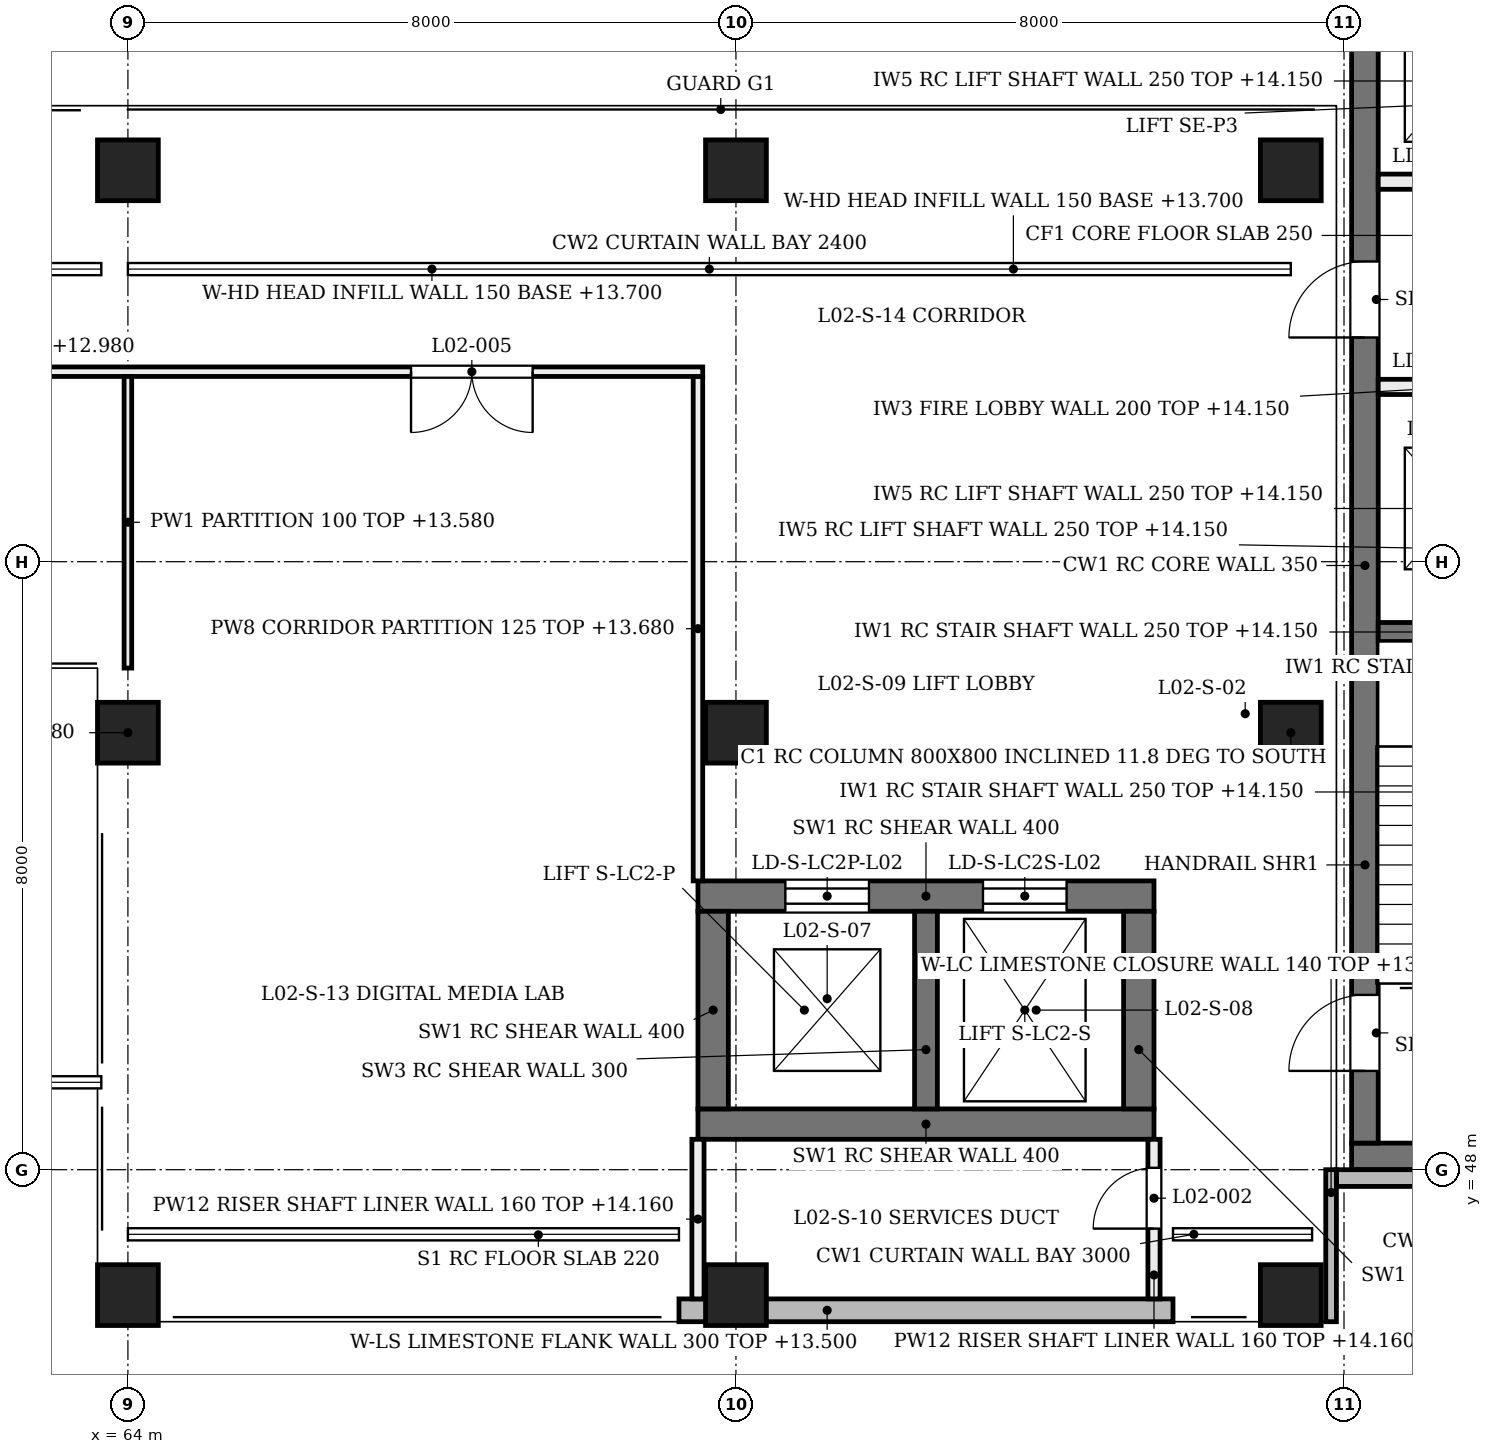
"""IFC4 building model, lengths in metres.
Left out: names, types, materials, properties, quantities, classifications, styles, units other than length and angle.
Written with IfcOpenShell. Run it as: python <this file> out.ifc"""

import sys

from ifc_helpers import new_model, si_unit, direction, frame, frame_2d, origin, origin_2d, place, context, subcontext, project, spatial, rectangle, extrude, element, fill, save


model = new_model("IFC4")
c1 = context("Model", 3, precision=1e-05, world=origin(), true_north=direction((0.0, 1.0)))
c2 = subcontext(c1, "Body", "Model", "MODEL_VIEW")
j1 = project(units=[si_unit("LENGTHUNIT", "METRE"), si_unit("PLANEANGLEUNIT", "RADIAN")], contexts=[c1])
p1 = place(None, origin())
s1 = spatial("IfcSite", under=j1, at=p1, CompositionType="ELEMENT")
p2 = place(p1, origin())
s2 = spatial("IfcBuilding", under=s1, at=p2, CompositionType="ELEMENT")
p3 = place(p2, frame((0.0, 0.0, 9.6)))
s3 = spatial("IfcBuildingStorey", under=s2, at=p3, CompositionType="ELEMENT", Elevation=9.6)
p4 = place(p3, frame((71.5, 48.6, 0.0), z_axis=(0.0, 0.0, 1.0), x_axis=(1.0, 0.0, 0.0)))
e1 = element("IfcWall", 1, at=p4, inside=s3, PredefinedType="SHEAR", context=c2, shape_type="SweptSolid", body=[
    extrude(rectangle(XDim=6.0, YDim=0.4, at=frame_2d((3.0, 0.0))), origin(), (0.0, 0.0, 1.0), 4.58),
])
p5 = place(p3, frame((71.5, 51.6, 0.0), z_axis=(0.0, 0.0, 1.0), x_axis=(1.0, 0.0, 0.0)))
e2 = element("IfcWall", 2, at=p5, inside=s3, PredefinedType="SHEAR", context=c2, shape_type="SweptSolid", body=[
    extrude(rectangle(XDim=6.0, YDim=0.4, at=frame_2d((3.0, 0.0))), origin(), (0.0, 0.0, 1.0), 4.58),
])
p6 = place(p5, frame((1.15, 0.0, 0.0)))
e3 = element("IfcOpeningElement", 3, at=p6, cuts=e2, PredefinedType="OPENING", context=c2, shape_type="SweptSolid", body=[
    extrude(rectangle(XDim=1.1, YDim=2.1, at=frame_2d((0.55, 1.05))), frame((0.0, 0.21, 0.0), z_axis=(0.0, -1.0, 0.0), x_axis=(1.0, 0.0, 0.0)), (0.0, 0.0, 1.0), 0.42),
])
p7 = place(p5, frame((3.75, 0.0, 0.0)))
e4 = element("IfcOpeningElement", 4, at=p7, cuts=e2, PredefinedType="OPENING", context=c2, shape_type="SweptSolid", body=[
    extrude(rectangle(XDim=1.1, YDim=2.1, at=frame_2d((0.55, 1.05))), frame((0.0, 0.21, 0.0), z_axis=(0.0, -1.0, 0.0), x_axis=(1.0, 0.0, 0.0)), (0.0, 0.0, 1.0), 0.42),
])
for number, where, z_axis, x_axis in (
    (5, (71.7, 48.8, 0.0), (0.0, 0.0, 1.0), (0.0, 1.0, 0.0)),
    (6, (77.3, 48.8, 0.0), (0.0, 0.0, 1.0), (0.0, 1.0, 0.0)),
):
    element("IfcWall", number, at=place(p3, frame(where, z_axis=z_axis, x_axis=x_axis)), inside=s3, PredefinedType="SHEAR", context=c2, shape_type="SweptSolid", body=[
        extrude(rectangle(XDim=2.6, YDim=0.4, at=frame_2d((1.3, 0.0))), origin(), (0.0, 0.0, 1.0), 4.58),
    ])
p8 = place(p3, frame((74.5, 48.8, 0.0), z_axis=(0.0, 0.0, 1.0), x_axis=(0.0, 1.0, 0.0)))
e7 = element("IfcWall", 7, at=p8, inside=s3, PredefinedType="SHEAR", context=c2, shape_type="SweptSolid", body=[
    extrude(rectangle(XDim=2.6, YDim=0.3, at=frame_2d((1.3, 0.0))), origin(), (0.0, 0.0, 1.0), 4.58),
])
p9 = place(p3, frame((80.1, 48.175, 0.0), z_axis=(0.0, 0.0, 1.0), x_axis=(1.0, 0.0, 0.0)))
e8 = element("IfcWall", 8, at=p9, inside=s3, PredefinedType="SHEAR", context=c2, shape_type="SweptSolid", body=[
    extrude(rectangle(XDim=7.9, YDim=0.35, at=frame_2d((3.95, 0.0))), origin(), (0.0, 0.0, 1.0), 4.58),
])
p10 = place(p3, frame((80.275, 48.35, 0.0), z_axis=(0.0, 0.0, 1.0), x_axis=(0.0, 1.0, 0.0)))
e9 = element("IfcWall", 9, at=p10, inside=s3, PredefinedType="SHEAR", context=c2, shape_type="SweptSolid", body=[
    extrude(rectangle(XDim=15.2, YDim=0.35, at=frame_2d((7.6, 0.0))), origin(), (0.0, 0.0, 1.0), 4.58),
])
p11 = place(p10, frame((0.95, 0.0, 0.0)))
e10 = element("IfcOpeningElement", 10, at=p11, cuts=e9, PredefinedType="OPENING", context=c2, shape_type="SweptSolid", body=[
    extrude(rectangle(XDim=1.0, YDim=2.1, at=frame_2d((0.5, 1.05))), frame((0.0, 0.185, 0.0), z_axis=(0.0, -1.0, 0.0), x_axis=(1.0, 0.0, 0.0)), (0.0, 0.0, 1.0), 0.37),
])
p12 = place(p10, frame((10.6, 0.0, 0.0)))
e11 = element("IfcOpeningElement", 11, at=p12, cuts=e9, PredefinedType="OPENING", context=c2, shape_type="SweptSolid", body=[
    extrude(rectangle(XDim=1.0, YDim=2.1, at=frame_2d((0.5, 1.05))), frame((0.0, 0.185, 0.0), z_axis=(0.0, -1.0, 0.0), x_axis=(1.0, 0.0, 0.0)), (0.0, 0.0, 1.0), 0.37),
])
for number, where, z_axis, x_axis in (
    (12, (64.0, 46.6, 0.0), (0.0, -0.204, 0.979), (1.0, 0.0, 0.0)),
    (13, (72.0, 46.6, 0.0), (0.0, -0.204, 0.979), (1.0, 0.0, 0.0)),
    (14, (79.3, 46.6, 0.0), (0.0, -0.204, 0.979), (1.0, 0.0, 0.0)),
):
    element("IfcColumn", number, at=place(p3, frame(where, z_axis=z_axis, x_axis=x_axis)), inside=s3, PredefinedType="COLUMN", context=c2, shape_type="SweptSolid", body=[
        extrude(rectangle(XDim=0.8, YDim=0.8, at=origin_2d()), origin(), (0.0, 0.0, 1.0), 4.903),
    ])
p13 = place(p3, frame((64.0, 54.046, -0.22), z_axis=(0.0, -0.203965661733, 0.978978043081), x_axis=(1.0, 0.0, 0.0)))
e15 = element("IfcColumn", 15, at=p13, inside=s3, PredefinedType="COLUMN", context=c2, shape_type="SweptSolid", body=[
    extrude(rectangle(XDim=0.8, YDim=0.8, at=origin_2d()), origin(), (0.0, 0.0, 1.0), 5.128),
])
for number, where, z_axis, x_axis in (
    (16, (72.0, 54.0, 0.0), (0.0, -0.204, 0.979), (1.0, 0.0, 0.0)),
    (17, (79.3, 54.0, 0.0), (0.0, -0.204, 0.979), (1.0, 0.0, 0.0)),
):
    element("IfcColumn", number, at=place(p3, frame(where, z_axis=z_axis, x_axis=x_axis)), inside=s3, PredefinedType="COLUMN", context=c2, shape_type="SweptSolid", body=[
        extrude(rectangle(XDim=0.8, YDim=0.8, at=origin_2d()), origin(), (0.0, 0.0, 1.0), 4.903),
    ])
p14 = place(p3, frame((64.0, 61.446, -0.22), z_axis=(0.0, -0.203965661733, 0.978978043081), x_axis=(1.0, 0.0, 0.0)))
e18 = element("IfcColumn", 18, at=p14, inside=s3, PredefinedType="COLUMN", context=c2, shape_type="SweptSolid", body=[
    extrude(rectangle(XDim=0.8, YDim=0.8, at=origin_2d()), origin(), (0.0, 0.0, 1.0), 5.128),
])
for number, where, z_axis, x_axis in (
    (19, (72.0, 61.4, 0.0), (0.0, -0.204, 0.979), (1.0, 0.0, 0.0)),
    (20, (79.3, 61.4, 0.0), (0.0, -0.204, 0.979), (1.0, 0.0, 0.0)),
):
    element("IfcColumn", number, at=place(p3, frame(where, z_axis=z_axis, x_axis=x_axis)), inside=s3, PredefinedType="COLUMN", context=c2, shape_type="SweptSolid", body=[
        extrude(rectangle(XDim=0.8, YDim=0.8, at=origin_2d()), origin(), (0.0, 0.0, 1.0), 4.903),
    ])
p15 = place(p3, frame((71.25, 46.15, 0.0), z_axis=(0.0, 0.0, 1.0), x_axis=(1.0, 0.0, 0.0)))
e21 = element("IfcWall", 21, at=p15, inside=s3, PredefinedType="SOLIDWALL", context=c2, shape_type="SweptSolid", body=[
    extrude(rectangle(XDim=6.5, YDim=0.3, at=frame_2d((3.25, 0.0))), origin(), (0.0, 0.0, 1.0), 3.9),
])
p16 = place(p3, frame((64.2, 59.85, 4.1), z_axis=(0.0, 0.0, 1.0), x_axis=(1.0, 0.0, 0.0)))
e22 = element("IfcWall", 22, at=p16, inside=s3, PredefinedType="SOLIDWALL", context=c2, shape_type="SweptSolid", body=[
    extrude(rectangle(XDim=7.6, YDim=0.15, at=frame_2d((3.8, 0.0))), origin(), (0.0, 0.0, 1.0), 0.48),
])
p17 = place(p3, frame((72.2, 59.85, 4.1), z_axis=(0.0, 0.0, 1.0), x_axis=(1.0, 0.0, 0.0)))
e23 = element("IfcWall", 23, at=p17, inside=s3, PredefinedType="SOLIDWALL", context=c2, shape_type="SweptSolid", body=[
    extrude(rectangle(XDim=6.9, YDim=0.15, at=frame_2d((3.45, 0.0))), origin(), (0.0, 0.0, 1.0), 0.48),
])
p18 = place(p3, frame((79.9, 47.89, 0.0), z_axis=(0.0, 0.0, 1.0), x_axis=(1.0, 0.0, 0.0)))
e24 = element("IfcWall", 24, at=p18, inside=s3, PredefinedType="SOLIDWALL", context=c2, shape_type="SweptSolid", body=[
    extrude(rectangle(XDim=8.2, YDim=0.22, at=frame_2d((4.1, 0.0))), origin(), (0.0, 0.0, 1.0), 3.9),
])
p19 = place(p18, frame((1.308, 0.0, 0.9)))
e25 = element("IfcOpeningElement", 25, at=p19, cuts=e24, PredefinedType="OPENING", context=c2, shape_type="SweptSolid", body=[
    extrude(rectangle(XDim=0.45, YDim=2.6, at=frame_2d((0.225, 1.3))), frame((0.0, 0.12, 0.0), z_axis=(0.0, -1.0, 0.0), x_axis=(1.0, 0.0, 0.0)), (0.0, 0.0, 1.0), 0.24),
])
p20 = place(p18, frame((3.975, 0.0, 0.9)))
e26 = element("IfcOpeningElement", 26, at=p20, cuts=e24, PredefinedType="OPENING", context=c2, shape_type="SweptSolid", body=[
    extrude(rectangle(XDim=0.45, YDim=2.6, at=frame_2d((0.225, 1.3))), frame((0.0, 0.12, 0.0), z_axis=(0.0, -1.0, 0.0), x_axis=(1.0, 0.0, 0.0)), (0.0, 0.0, 1.0), 0.24),
])
p21 = place(p18, frame((6.642, 0.0, 0.9)))
e27 = element("IfcOpeningElement", 27, at=p21, cuts=e24, PredefinedType="OPENING", context=c2, shape_type="SweptSolid", body=[
    extrude(rectangle(XDim=0.45, YDim=2.6, at=frame_2d((0.225, 1.3))), frame((0.0, 0.12, 0.0), z_axis=(0.0, -1.0, 0.0), x_axis=(1.0, 0.0, 0.0)), (0.0, 0.0, 1.0), 0.24),
])
p22 = place(p3, frame((79.83, 46.0, 0.0), z_axis=(0.0, 0.0, 1.0), x_axis=(0.0, 1.0, 0.0)))
e28 = element("IfcWall", 28, at=p22, inside=s3, PredefinedType="SOLIDWALL", context=c2, shape_type="SweptSolid", body=[
    extrude(rectangle(XDim=2.0, YDim=0.14, at=frame_2d((1.0, 0.0))), origin(), (0.0, 0.0, 1.0), 3.9),
])
p23 = place(p3, frame((83.55, 55.075, 0.0), z_axis=(0.0, 0.0, 1.0), x_axis=(-1.0, 0.0, 0.0)))
e29 = element("IfcWall", 29, at=p23, inside=s3, PredefinedType="SOLIDWALL", context=c2, shape_type="SweptSolid", body=[
    extrude(rectangle(XDim=3.1, YDim=0.25, at=frame_2d((1.55, 0.0))), origin(), (0.0, 0.0, 1.0), 4.55),
])
p24 = place(p3, frame((87.65, 58.3, 0.0), z_axis=(0.0, 0.0, 1.0), x_axis=(-1.0, 0.0, 0.0)))
e30 = element("IfcWall", 30, at=p24, inside=s3, PredefinedType="SOLIDWALL", context=c2, shape_type="SweptSolid", body=[
    extrude(rectangle(XDim=7.2, YDim=0.2, at=frame_2d((3.6, 0.0))), origin(), (0.0, 0.0, 1.0), 4.55),
])
p25 = place(p24, frame((0.5, 0.0, 0.0)))
e31 = element("IfcOpeningElement", 31, at=p25, cuts=e30, PredefinedType="OPENING", context=c2, shape_type="SweptSolid", body=[
    extrude(rectangle(XDim=1.1, YDim=2.1, at=frame_2d((0.55, 1.05))), frame((0.0, 0.11, 0.0), z_axis=(0.0, -1.0, 0.0), x_axis=(1.0, 0.0, 0.0)), (0.0, 0.0, 1.0), 0.22),
])
p26 = place(p24, frame((5.6, 0.0, 0.0)))
e32 = element("IfcOpeningElement", 32, at=p26, cuts=e30, PredefinedType="OPENING", context=c2, shape_type="SweptSolid", body=[
    extrude(rectangle(XDim=1.1, YDim=2.1, at=frame_2d((0.55, 1.05))), frame((0.0, 0.11, 0.0), z_axis=(0.0, -1.0, 0.0), x_axis=(1.0, 0.0, 0.0)), (0.0, 0.0, 1.0), 0.22),
])
p27 = place(p24, frame((3.1, 0.0, 0.0)))
e33 = element("IfcOpeningElement", 33, at=p27, cuts=e30, PredefinedType="OPENING", context=c2, shape_type="SweptSolid", body=[
    extrude(rectangle(XDim=1.0, YDim=2.1, at=frame_2d((0.5, 1.05))), frame((0.0, 0.11, 0.0), z_axis=(0.0, -1.0, 0.0), x_axis=(1.0, 0.0, 0.0)), (0.0, 0.0, 1.0), 0.22),
])
p28 = place(p3, frame((87.65, 61.0, 0.0), z_axis=(0.0, 0.0, 1.0), x_axis=(-1.0, 0.0, 0.0)))
e34 = element("IfcWall", 34, at=p28, inside=s3, PredefinedType="SOLIDWALL", context=c2, shape_type="SweptSolid", body=[
    extrude(rectangle(XDim=7.2, YDim=0.2, at=frame_2d((3.6, 0.0))), origin(), (0.0, 0.0, 1.0), 4.55),
])
p29 = place(p28, frame((0.5, 0.0, 0.0)))
e35 = element("IfcOpeningElement", 35, at=p29, cuts=e34, PredefinedType="OPENING", context=c2, shape_type="SweptSolid", body=[
    extrude(rectangle(XDim=1.1, YDim=2.1, at=frame_2d((0.55, 1.05))), frame((0.0, 0.11, 0.0), z_axis=(0.0, -1.0, 0.0), x_axis=(1.0, 0.0, 0.0)), (0.0, 0.0, 1.0), 0.22),
])
p30 = place(p28, frame((5.6, 0.0, 0.0)))
e36 = element("IfcOpeningElement", 36, at=p30, cuts=e34, PredefinedType="OPENING", context=c2, shape_type="SweptSolid", body=[
    extrude(rectangle(XDim=1.1, YDim=2.1, at=frame_2d((0.55, 1.05))), frame((0.0, 0.11, 0.0), z_axis=(0.0, -1.0, 0.0), x_axis=(1.0, 0.0, 0.0)), (0.0, 0.0, 1.0), 0.22),
])
p31 = place(p28, frame((3.1, 0.0, 0.0)))
e37 = element("IfcOpeningElement", 37, at=p31, cuts=e34, PredefinedType="OPENING", context=c2, shape_type="SweptSolid", body=[
    extrude(rectangle(XDim=1.0, YDim=2.1, at=frame_2d((0.5, 1.05))), frame((0.0, 0.11, 0.0), z_axis=(0.0, -1.0, 0.0), x_axis=(1.0, 0.0, 0.0)), (0.0, 0.0, 1.0), 0.22),
])
p32 = place(p3, frame((77.5, 46.3, 0.0), z_axis=(0.0, 0.0, 1.0), x_axis=(0.0, 1.0, 0.0)))
e38 = element("IfcWall", 38, at=p32, inside=s3, PredefinedType="PARTITIONING", context=c2, shape_type="SweptSolid", body=[
    extrude(rectangle(XDim=2.1, YDim=0.16, at=frame_2d((1.05, 0.0))), origin(), (0.0, 0.0, 1.0), 4.56),
])
p33 = place(p32, frame((0.925, 0.0, 0.0)))
e39 = element("IfcOpeningElement", 39, at=p33, cuts=e38, PredefinedType="OPENING", context=c2, shape_type="SweptSolid", body=[
    extrude(rectangle(XDim=0.8, YDim=2.1, at=frame_2d((0.4, 1.05))), frame((0.0, 0.09, 0.0), z_axis=(0.0, -1.0, 0.0), x_axis=(1.0, 0.0, 0.0)), (0.0, 0.0, 1.0), 0.18),
])
p34 = place(p3, frame((71.5, 46.3, 0.0), z_axis=(0.0, 0.0, 1.0), x_axis=(0.0, 1.0, 0.0)))
e40 = element("IfcWall", 40, at=p34, inside=s3, PredefinedType="PARTITIONING", context=c2, shape_type="SweptSolid", body=[
    extrude(rectangle(XDim=2.1, YDim=0.16, at=frame_2d((1.05, 0.0))), origin(), (0.0, 0.0, 1.0), 4.56),
])
p35 = place(p3, frame((71.5, 51.8, 0.0), z_axis=(0.0, 0.0, 1.0), x_axis=(0.0, 1.0, 0.0)))
e41 = element("IfcWall", 41, at=p35, inside=s3, PredefinedType="PARTITIONING", context=c2, shape_type="SweptSolid", body=[
    extrude(rectangle(XDim=6.637, YDim=0.125, at=frame_2d((3.319, 0.0))), origin(), (0.0, 0.0, 1.0), 4.08),
])
p36 = place(p3, frame((32.438, 58.5, 0.0), z_axis=(0.0, 0.0, 1.0), x_axis=(1.0, 0.0, 0.0)))
e42 = element("IfcWall", 42, at=p36, inside=s3, PredefinedType="PARTITIONING", context=c2, shape_type="SweptSolid", body=[
    extrude(rectangle(XDim=39.125, YDim=0.125, at=frame_2d((19.562, 0.0))), origin(), (0.0, 0.0, 1.0), 3.38),
])
p37 = place(p36, frame((2.238, 0.0, 0.0)))
e43 = element("IfcOpeningElement", 43, at=p37, cuts=e42, PredefinedType="OPENING", context=c2, shape_type="SweptSolid", body=[
    extrude(rectangle(XDim=1.6, YDim=2.2, at=frame_2d((0.8, 1.1))), frame((0.0, 0.073, 0.0), z_axis=(0.0, -1.0, 0.0), x_axis=(1.0, 0.0, 0.0)), (0.0, 0.0, 1.0), 0.145),
])
p38 = place(p36, frame((18.762, 0.0, 0.0)))
e44 = element("IfcOpeningElement", 44, at=p38, cuts=e42, PredefinedType="OPENING", context=c2, shape_type="SweptSolid", body=[
    extrude(rectangle(XDim=1.6, YDim=2.2, at=frame_2d((0.8, 1.1))), frame((0.0, 0.073, 0.0), z_axis=(0.0, -1.0, 0.0), x_axis=(1.0, 0.0, 0.0)), (0.0, 0.0, 1.0), 0.145),
])
p39 = place(p36, frame((35.288, 0.0, 0.0)))
e45 = element("IfcOpeningElement", 45, at=p39, cuts=e42, PredefinedType="OPENING", context=c2, shape_type="SweptSolid", body=[
    extrude(rectangle(XDim=1.6, YDim=2.2, at=frame_2d((0.8, 1.1))), frame((0.0, 0.073, 0.0), z_axis=(0.0, -1.0, 0.0), x_axis=(1.0, 0.0, 0.0)), (0.0, 0.0, 1.0), 0.145),
])
p40 = place(p3, frame((64.0, 54.6, 0.0), z_axis=(0.0, 0.0, 1.0), x_axis=(0.0, 1.0, 0.0)))
e46 = element("IfcWall", 46, at=p40, inside=s3, PredefinedType="PARTITIONING", context=c2, shape_type="SweptSolid", body=[
    extrude(rectangle(XDim=3.837, YDim=0.1, at=frame_2d((1.919, 0.0))), origin(), (0.0, 0.0, 1.0), 3.98),
])
p41 = place(p11, origin())
e47 = element("IfcDoor", 47, at=p41, inside=s3, OperationType="SINGLE_SWING_LEFT", PredefinedType="DOOR", context=c2, shape_type="SweptSolid", body=[
    extrude(rectangle(XDim=1.0, YDim=2.1, at=frame_2d((0.5, 1.05))), frame((0.0, 0.025, 0.0), z_axis=(0.0, -1.0, 0.0), x_axis=(1.0, 0.0, 0.0)), (0.0, 0.0, 1.0), 0.05),
])
fill(e10, e47)
p42 = place(p12, origin())
e48 = element("IfcDoor", 48, at=p42, inside=s3, OperationType="SINGLE_SWING_LEFT", PredefinedType="DOOR", context=c2, shape_type="SweptSolid", body=[
    extrude(rectangle(XDim=1.0, YDim=2.1, at=frame_2d((0.5, 1.05))), frame((0.0, 0.025, 0.0), z_axis=(0.0, -1.0, 0.0), x_axis=(1.0, 0.0, 0.0)), (0.0, 0.0, 1.0), 0.05),
])
fill(e11, e48)
p43 = place(p6, origin())
e49 = element("IfcDoor", 49, at=p43, inside=s3, OperationType="DOUBLE_DOOR_SLIDING", PredefinedType="DOOR", context=c2, shape_type="SweptSolid", body=[
    extrude(rectangle(XDim=1.1, YDim=2.1, at=frame_2d((0.55, 1.05))), frame((0.0, 0.025, 0.0), z_axis=(0.0, -1.0, 0.0), x_axis=(1.0, 0.0, 0.0)), (0.0, 0.0, 1.0), 0.05),
])
fill(e3, e49)
p44 = place(p7, origin())
e50 = element("IfcDoor", 50, at=p44, inside=s3, OperationType="DOUBLE_DOOR_SLIDING", PredefinedType="DOOR", context=c2, shape_type="SweptSolid", body=[
    extrude(rectangle(XDim=1.1, YDim=2.1, at=frame_2d((0.55, 1.05))), frame((0.0, 0.025, 0.0), z_axis=(0.0, -1.0, 0.0), x_axis=(1.0, 0.0, 0.0)), (0.0, 0.0, 1.0), 0.05),
])
fill(e4, e50)
p45 = place(p33, origin())
e51 = element("IfcDoor", 51, at=p45, inside=s3, OperationType="SINGLE_SWING_LEFT", PredefinedType="DOOR", context=c2, shape_type="SweptSolid", body=[
    extrude(rectangle(XDim=0.8, YDim=2.1, at=frame_2d((0.4, 1.05))), frame((0.0, 0.025, 0.0), z_axis=(0.0, -1.0, 0.0), x_axis=(1.0, 0.0, 0.0)), (0.0, 0.0, 1.0), 0.05),
])
fill(e39, e51)
p46 = place(p39, frame((1.6, 0.0, 0.0), z_axis=(0.0, 0.0, 1.0), x_axis=(-1.0, 0.0, 0.0)))
e52 = element("IfcDoor", 52, at=p46, inside=s3, OperationType="DOUBLE_DOOR_SINGLE_SWING", PredefinedType="DOOR", context=c2, shape_type="SweptSolid", body=[
    extrude(rectangle(XDim=1.6, YDim=2.2, at=frame_2d((0.8, 1.1))), frame((0.0, 0.025, 0.0), z_axis=(0.0, -1.0, 0.0), x_axis=(1.0, 0.0, 0.0)), (0.0, 0.0, 1.0), 0.05),
])
fill(e45, e52)
save(model, sys.argv[1])
